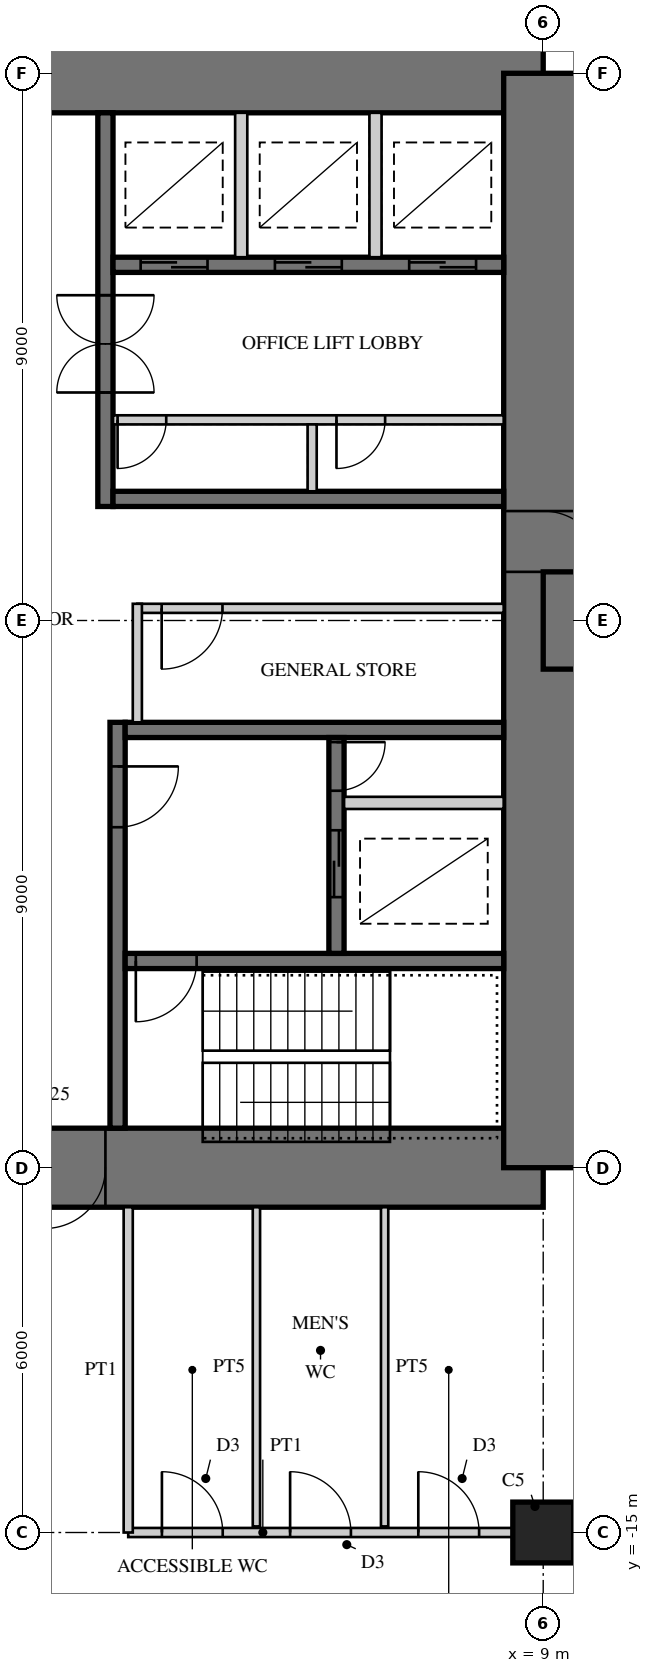
"""IFC4 building model, lengths in metres.
Left out: names, types, materials, properties, quantities, classifications, styles, units other than length and angle.
Written with IfcOpenShell. Run it as: python <this file> out.ifc"""

import sys

from ifc_helpers import new_model, si_unit, direction, frame, frame_2d, origin, origin_2d, place, context, subcontext, project, spatial, rectangle, extrude, element, fill, save


model = new_model("IFC4")
c1 = context("Model", 3, precision=1e-05, world=origin(), true_north=direction((0.0, 1.0)))
c2 = subcontext(c1, "Body", "Model", "MODEL_VIEW")
j1 = project(units=[si_unit("LENGTHUNIT", "METRE"), si_unit("PLANEANGLEUNIT", "RADIAN")], contexts=[c1])
p1 = place(None, origin())
s1 = spatial("IfcSite", under=j1, at=p1, CompositionType="ELEMENT")
p2 = place(p1, origin())
s2 = spatial("IfcBuilding", under=s1, at=p2, CompositionType="ELEMENT")
p3 = place(p2, frame((0.0, 0.0, 160.5)))
s3 = spatial("IfcBuildingStorey", under=s2, at=p3, CompositionType="ELEMENT", Elevation=160.5)
p4 = place(p3, frame((9.0, 9.0, 0.0), z_axis=(0.0, 0.0, 1.0), x_axis=(-1.0, 0.0, 0.0)))
e1 = element("IfcWall", 1, at=p4, inside=s3, PredefinedType="SHEAR", context=c2, shape_type="SweptSolid", body=[
    extrude(rectangle(XDim=18.0, YDim=1.3, at=frame_2d((9.0, 0.0))), origin(), (0.0, 0.0, 1.0), 4.0),
])
p5 = place(p4, frame((9.8, 0.0, 0.0)))
e2 = element("IfcOpeningElement", 2, at=p5, cuts=e1, PredefinedType="OPENING", context=c2, shape_type="SweptSolid", body=[
    extrude(rectangle(XDim=1.0, YDim=2.4, at=frame_2d((0.5, 1.2))), frame((0.0, 0.66, 0.0), z_axis=(0.0, -1.0, 0.0), x_axis=(1.0, 0.0, 0.0)), (0.0, 0.0, 1.0), 1.32),
])
p6 = place(p3, frame((-9.0, -9.0, 0.0), z_axis=(0.0, 0.0, 1.0), x_axis=(1.0, 0.0, 0.0)))
e3 = element("IfcWall", 3, at=p6, inside=s3, PredefinedType="SHEAR", context=c2, shape_type="SweptSolid", body=[
    extrude(rectangle(XDim=18.0, YDim=1.3, at=frame_2d((9.0, 0.0))), origin(), (0.0, 0.0, 1.0), 4.0),
])
p7 = place(p6, frame((9.8, 0.0, 0.0)))
e4 = element("IfcOpeningElement", 4, at=p7, cuts=e3, PredefinedType="OPENING", context=c2, shape_type="SweptSolid", body=[
    extrude(rectangle(XDim=1.0, YDim=2.4, at=frame_2d((0.5, 1.2))), frame((0.0, 0.66, 0.0), z_axis=(0.0, -1.0, 0.0), x_axis=(1.0, 0.0, 0.0)), (0.0, 0.0, 1.0), 1.32),
])
p8 = place(p3, frame((9.0, -9.0, 0.0), z_axis=(0.0, 0.0, 1.0), x_axis=(0.0, 1.0, 0.0)))
e5 = element("IfcWall", 5, at=p8, inside=s3, PredefinedType="SHEAR", context=c2, shape_type="SweptSolid", body=[
    extrude(rectangle(XDim=18.0, YDim=1.3, at=frame_2d((9.0, 0.0))), origin(), (0.0, 0.0, 1.0), 4.0),
])
p9 = place(p8, frame((9.8, 0.0, 0.0)))
e6 = element("IfcOpeningElement", 6, at=p9, cuts=e5, PredefinedType="OPENING", context=c2, shape_type="SweptSolid", body=[
    extrude(rectangle(XDim=1.0, YDim=2.4, at=frame_2d((0.5, 1.2))), frame((0.0, 0.66, 0.0), z_axis=(0.0, -1.0, 0.0), x_axis=(1.0, 0.0, 0.0)), (0.0, 0.0, 1.0), 1.32),
])
p10 = place(p3, frame((1.8, 1.875, 0.0), z_axis=(0.0, 0.0, 1.0), x_axis=(0.0, 1.0, 0.0)))
e7 = element("IfcWall", 7, at=p10, inside=s3, PredefinedType="SHEAR", context=c2, shape_type="SweptSolid", body=[
    extrude(rectangle(XDim=6.475, YDim=0.25, at=frame_2d((3.238, 0.0))), origin(), (0.0, 0.0, 1.0), 4.0),
])
p11 = place(p10, frame((1.875, 0.0, 0.0)))
e8 = element("IfcOpeningElement", 8, at=p11, cuts=e7, PredefinedType="OPENING", context=c2, shape_type="SweptSolid", body=[
    extrude(rectangle(XDim=1.6, YDim=2.4, at=frame_2d((0.8, 1.2))), frame((0.0, 0.135, 0.0), z_axis=(0.0, -1.0, 0.0), x_axis=(1.0, 0.0, 0.0)), (0.0, 0.0, 1.0), 0.27),
])
p12 = place(p3, frame((1.925, 2.0, 0.0), z_axis=(0.0, 0.0, 1.0), x_axis=(1.0, 0.0, 0.0)))
e9 = element("IfcWall", 9, at=p12, inside=s3, PredefinedType="SHEAR", context=c2, shape_type="SweptSolid", body=[
    extrude(rectangle(XDim=6.425, YDim=0.25, at=frame_2d((3.212, 0.0))), origin(), (0.0, 0.0, 1.0), 4.0),
])
p13 = place(p3, frame((1.925, 5.85, 0.0), z_axis=(0.0, 0.0, 1.0), x_axis=(1.0, 0.0, 0.0)))
e10 = element("IfcWall", 10, at=p13, inside=s3, PredefinedType="SHEAR", context=c2, shape_type="SweptSolid", body=[
    extrude(rectangle(XDim=6.425, YDim=0.25, at=frame_2d((3.212, 0.0))), origin(), (0.0, 0.0, 1.0), 4.0),
])
p14 = place(p13, frame((0.454, 0.0, 0.0)))
e11 = element("IfcOpeningElement", 11, at=p14, cuts=e10, PredefinedType="OPENING", context=c2, shape_type="SweptSolid", body=[
    extrude(rectangle(XDim=1.1, YDim=2.2, at=frame_2d((0.55, 1.1))), frame((0.0, 0.135, 0.0), z_axis=(0.0, -1.0, 0.0), x_axis=(1.0, 0.0, 0.0)), (0.0, 0.0, 1.0), 0.27),
])
p15 = place(p13, frame((2.663, 0.0, 0.0)))
e12 = element("IfcOpeningElement", 12, at=p15, cuts=e10, PredefinedType="OPENING", context=c2, shape_type="SweptSolid", body=[
    extrude(rectangle(XDim=1.1, YDim=2.2, at=frame_2d((0.55, 1.1))), frame((0.0, 0.135, 0.0), z_axis=(0.0, -1.0, 0.0), x_axis=(1.0, 0.0, 0.0)), (0.0, 0.0, 1.0), 0.27),
])
p16 = place(p13, frame((4.871, 0.0, 0.0)))
e13 = element("IfcOpeningElement", 13, at=p16, cuts=e10, PredefinedType="OPENING", context=c2, shape_type="SweptSolid", body=[
    extrude(rectangle(XDim=1.1, YDim=2.2, at=frame_2d((0.55, 1.1))), frame((0.0, 0.135, 0.0), z_axis=(0.0, -1.0, 0.0), x_axis=(1.0, 0.0, 0.0)), (0.0, 0.0, 1.0), 0.27),
])
p17 = place(p3, frame((1.925, 3.3, 0.0), z_axis=(0.0, 0.0, 1.0), x_axis=(1.0, 0.0, 0.0)))
e14 = element("IfcWall", 14, at=p17, inside=s3, PredefinedType="PARTITIONING", context=c2, shape_type="SweptSolid", body=[
    extrude(rectangle(XDim=6.425, YDim=0.15, at=frame_2d((3.212, 0.0))), origin(), (0.0, 0.0, 1.0), 4.0),
])
p18 = place(p17, frame((0.075, 0.0, 0.0)))
e15 = element("IfcOpeningElement", 15, at=p18, cuts=e14, PredefinedType="OPENING", context=c2, shape_type="SweptSolid", body=[
    extrude(rectangle(XDim=0.8, YDim=2.1, at=frame_2d((0.4, 1.05))), frame((0.0, 0.085, 0.0), z_axis=(0.0, -1.0, 0.0), x_axis=(1.0, 0.0, 0.0)), (0.0, 0.0, 1.0), 0.17),
])
p19 = place(p17, frame((3.675, 0.0, 0.0)))
e16 = element("IfcOpeningElement", 16, at=p19, cuts=e14, PredefinedType="OPENING", context=c2, shape_type="SweptSolid", body=[
    extrude(rectangle(XDim=0.8, YDim=2.1, at=frame_2d((0.4, 1.05))), frame((0.0, 0.085, 0.0), z_axis=(0.0, -1.0, 0.0), x_axis=(1.0, 0.0, 0.0)), (0.0, 0.0, 1.0), 0.17),
])
p20 = place(p3, frame((5.2, 2.125, 0.0), z_axis=(0.0, 0.0, 1.0), x_axis=(0.0, 1.0, 0.0)))
e17 = element("IfcWall", 17, at=p20, inside=s3, PredefinedType="PARTITIONING", context=c2, shape_type="SweptSolid", body=[
    extrude(rectangle(XDim=1.1, YDim=0.15, at=frame_2d((0.55, 0.0))), origin(), (0.0, 0.0, 1.0), 4.0),
])
for number, where, z_axis, x_axis in (
    (18, (4.033, 5.975, 0.0), (0.0, 0.0, 1.0), (0.0, 1.0, 0.0)),
    (19, (6.242, 5.975, 0.0), (0.0, 0.0, 1.0), (0.0, 1.0, 0.0)),
):
    element("IfcWall", number, at=place(p3, frame(where, z_axis=z_axis, x_axis=x_axis)), inside=s3, PredefinedType="PARTITIONING", context=c2, shape_type="SweptSolid", body=[
        extrude(rectangle(XDim=2.375, YDim=0.2, at=frame_2d((1.188, 0.0))), origin(), (0.0, 0.0, 1.0), 4.0),
    ])
p21 = place(p3, frame((2.0, -1.675, 0.0), z_axis=(0.0, 0.0, 1.0), x_axis=(0.0, -1.0, 0.0)))
e20 = element("IfcWall", 20, at=p21, inside=s3, PredefinedType="SHEAR", context=c2, shape_type="SweptSolid", body=[
    extrude(rectangle(XDim=6.675, YDim=0.25, at=frame_2d((3.337, 0.0))), origin(), (0.0, 0.0, 1.0), 4.0),
])
p22 = place(p21, frame((0.725, 0.0, 0.0)))
e21 = element("IfcOpeningElement", 21, at=p22, cuts=e20, PredefinedType="OPENING", context=c2, shape_type="SweptSolid", body=[
    extrude(rectangle(XDim=1.0, YDim=2.1, at=frame_2d((0.5, 1.05))), frame((0.0, 0.135, 0.0), z_axis=(0.0, -1.0, 0.0), x_axis=(1.0, 0.0, 0.0)), (0.0, 0.0, 1.0), 0.27),
])
p23 = place(p3, frame((2.125, -1.8, 0.0), z_axis=(0.0, 0.0, 1.0), x_axis=(1.0, 0.0, 0.0)))
e22 = element("IfcWall", 22, at=p23, inside=s3, PredefinedType="SHEAR", context=c2, shape_type="SweptSolid", body=[
    extrude(rectangle(XDim=6.225, YDim=0.25, at=frame_2d((3.113, 0.0))), origin(), (0.0, 0.0, 1.0), 4.0),
])
p24 = place(p3, frame((2.125, -5.6, 0.0), z_axis=(0.0, 0.0, 1.0), x_axis=(1.0, 0.0, 0.0)))
e23 = element("IfcWall", 23, at=p24, inside=s3, PredefinedType="SHEAR", context=c2, shape_type="SweptSolid", body=[
    extrude(rectangle(XDim=6.225, YDim=0.25, at=frame_2d((3.113, 0.0))), origin(), (0.0, 0.0, 1.0), 4.0),
])
p25 = place(p24, frame((0.175, 0.0, 0.0)))
e24 = element("IfcOpeningElement", 24, at=p25, cuts=e23, PredefinedType="OPENING", context=c2, shape_type="SweptSolid", body=[
    extrude(rectangle(XDim=1.0, YDim=2.1, at=frame_2d((0.5, 1.05))), frame((0.0, 0.135, 0.0), z_axis=(0.0, -1.0, 0.0), x_axis=(1.0, 0.0, 0.0)), (0.0, 0.0, 1.0), 0.27),
])
p26 = place(p3, frame((5.6, -1.925, 0.0), z_axis=(0.0, 0.0, 1.0), x_axis=(0.0, -1.0, 0.0)))
e25 = element("IfcWall", 25, at=p26, inside=s3, PredefinedType="SHEAR", context=c2, shape_type="SweptSolid", body=[
    extrude(rectangle(XDim=3.55, YDim=0.25, at=frame_2d((1.775, 0.0))), origin(), (0.0, 0.0, 1.0), 4.0),
])
p27 = place(p26, frame((1.525, 0.0, 0.0)))
e26 = element("IfcOpeningElement", 26, at=p27, cuts=e25, PredefinedType="OPENING", context=c2, shape_type="SweptSolid", body=[
    extrude(rectangle(XDim=1.1, YDim=2.2, at=frame_2d((0.55, 1.1))), frame((0.0, 0.135, 0.0), z_axis=(0.0, -1.0, 0.0), x_axis=(1.0, 0.0, 0.0)), (0.0, 0.0, 1.0), 0.27),
])
p28 = place(p26, frame((0.075, 0.0, 0.0)))
e27 = element("IfcOpeningElement", 27, at=p28, cuts=e25, PredefinedType="OPENING", context=c2, shape_type="SweptSolid", body=[
    extrude(rectangle(XDim=0.8, YDim=2.1, at=frame_2d((0.4, 1.05))), frame((0.0, 0.135, 0.0), z_axis=(0.0, -1.0, 0.0), x_axis=(1.0, 0.0, 0.0)), (0.0, 0.0, 1.0), 0.27),
])
p29 = place(p3, frame((5.725, -3.0, 0.0), z_axis=(0.0, 0.0, 1.0), x_axis=(1.0, 0.0, 0.0)))
e28 = element("IfcWall", 28, at=p29, inside=s3, PredefinedType="PARTITIONING", context=c2, shape_type="SweptSolid", body=[
    extrude(rectangle(XDim=2.625, YDim=0.2, at=frame_2d((1.312, 0.0))), origin(), (0.0, 0.0, 1.0), 4.0),
])
p30 = place(p3, frame((9.0, 0.0, 0.0), z_axis=(0.0, 0.0, 1.0), x_axis=(1.0, 0.0, 0.0)))
e29 = element("IfcWall", 29, at=p30, inside=s3, PredefinedType="SHEAR", context=c2, shape_type="SweptSolid", body=[
    extrude(rectangle(XDim=4.05, YDim=1.6, at=frame_2d((2.025, 0.0))), origin(), (0.0, 0.0, 1.0), 4.0),
])
p31 = place(p3, frame((9.0, -15.0, 0.0), z_axis=(0.0, 0.0, 1.0), x_axis=(1.0, 0.0, 0.0)))
e30 = element("IfcColumn", 30, at=p31, inside=s3, PredefinedType="COLUMN", context=c2, shape_type="SweptSolid", body=[
    extrude(rectangle(XDim=1.0, YDim=1.0, at=origin_2d()), origin(), (0.0, 0.0, 1.0), 4.0),
])
p32 = place(p3, frame((2.325, 0.2, 0.0), z_axis=(0.0, 0.0, 1.0), x_axis=(1.0, 0.0, 0.0)))
e31 = element("IfcWall", 31, at=p32, inside=s3, PredefinedType="PARTITIONING", context=c2, shape_type="SweptSolid", body=[
    extrude(rectangle(XDim=6.025, YDim=0.15, at=frame_2d((3.013, 0.0))), origin(), (0.0, 0.0, 1.0), 3.75),
])
p33 = place(p32, frame((0.4, 0.0, 0.0)))
e32 = element("IfcOpeningElement", 32, at=p33, cuts=e31, PredefinedType="OPENING", context=c2, shape_type="SweptSolid", body=[
    extrude(rectangle(XDim=1.0, YDim=2.1, at=frame_2d((0.5, 1.05))), frame((0.0, 0.085, 0.0), z_axis=(0.0, -1.0, 0.0), x_axis=(1.0, 0.0, 0.0)), (0.0, 0.0, 1.0), 0.17),
])
p34 = place(p3, frame((2.325, -1.675, 0.0), z_axis=(0.0, 0.0, 1.0), x_axis=(0.0, 1.0, 0.0)))
e33 = element("IfcWall", 33, at=p34, inside=s3, PredefinedType="PARTITIONING", context=c2, shape_type="SweptSolid", body=[
    extrude(rectangle(XDim=1.95, YDim=0.15, at=frame_2d((0.975, 0.0))), origin(), (0.0, 0.0, 1.0), 3.75),
])
p35 = place(p3, frame((2.175, -15.0, 0.0), z_axis=(0.0, 0.0, 1.0), x_axis=(1.0, 0.0, 0.0)))
e34 = element("IfcWall", 34, at=p35, inside=s3, PredefinedType="PARTITIONING", context=c2, shape_type="SweptSolid", body=[
    extrude(rectangle(XDim=6.325, YDim=0.15, at=frame_2d((3.163, 0.0))), origin(), (0.0, 0.0, 1.0), 2.7),
])
p36 = place(p35, frame((0.554, 0.0, 0.0)))
e35 = element("IfcOpeningElement", 35, at=p36, cuts=e34, PredefinedType="OPENING", context=c2, shape_type="SweptSolid", body=[
    extrude(rectangle(XDim=1.0, YDim=2.1, at=frame_2d((0.5, 1.05))), frame((0.0, 0.085, 0.0), z_axis=(0.0, -1.0, 0.0), x_axis=(1.0, 0.0, 0.0)), (0.0, 0.0, 1.0), 0.17),
])
p37 = place(p35, frame((2.663, 0.0, 0.0)))
e36 = element("IfcOpeningElement", 36, at=p37, cuts=e34, PredefinedType="OPENING", context=c2, shape_type="SweptSolid", body=[
    extrude(rectangle(XDim=1.0, YDim=2.1, at=frame_2d((0.5, 1.05))), frame((0.0, 0.085, 0.0), z_axis=(0.0, -1.0, 0.0), x_axis=(1.0, 0.0, 0.0)), (0.0, 0.0, 1.0), 0.17),
])
p38 = place(p35, frame((4.771, 0.0, 0.0)))
e37 = element("IfcOpeningElement", 37, at=p38, cuts=e34, PredefinedType="OPENING", context=c2, shape_type="SweptSolid", body=[
    extrude(rectangle(XDim=1.0, YDim=2.1, at=frame_2d((0.5, 1.05))), frame((0.0, 0.085, 0.0), z_axis=(0.0, -1.0, 0.0), x_axis=(1.0, 0.0, 0.0)), (0.0, 0.0, 1.0), 0.17),
])
p39 = place(p3, frame((2.175, -9.65, 0.0), z_axis=(0.0, 0.0, 1.0), x_axis=(0.0, -1.0, 0.0)))
e38 = element("IfcWall", 38, at=p39, inside=s3, PredefinedType="PARTITIONING", context=c2, shape_type="SweptSolid", body=[
    extrude(rectangle(XDim=5.35, YDim=0.15, at=frame_2d((2.675, 0.0))), origin(), (0.0, 0.0, 1.0), 3.75),
])
for number, where, z_axis, x_axis in (
    (39, (4.283, -9.65, 0.0), (0.0, 0.0, 1.0), (0.0, -1.0, 0.0)),
    (40, (6.392, -9.65, 0.0), (0.0, 0.0, 1.0), (0.0, -1.0, 0.0)),
):
    element("IfcWall", number, at=place(p3, frame(where, z_axis=z_axis, x_axis=x_axis)), inside=s3, PredefinedType="PLUMBINGWALL", context=c2, shape_type="SweptSolid", body=[
        extrude(rectangle(XDim=5.25, YDim=0.12, at=frame_2d((2.625, 0.0))), origin(), (0.0, 0.0, 1.0), 3.75),
    ])
p40 = place(p33, frame((1.0, 0.0, 0.0), z_axis=(0.0, 0.0, 1.0), x_axis=(-1.0, 0.0, 0.0)))
e41 = element("IfcDoor", 41, at=p40, inside=s3, OperationType="SINGLE_SWING_RIGHT", PredefinedType="DOOR", context=c2, shape_type="SweptSolid", body=[
    extrude(rectangle(XDim=1.0, YDim=2.1, at=frame_2d((0.5, 1.05))), frame((0.0, 0.025, 0.0), z_axis=(0.0, -1.0, 0.0), x_axis=(1.0, 0.0, 0.0)), (0.0, 0.0, 1.0), 0.05),
])
fill(e32, e41)
p41 = place(p36, origin())
e42 = element("IfcDoor", 42, at=p41, inside=s3, OperationType="SINGLE_SWING_LEFT", PredefinedType="DOOR", context=c2, shape_type="SweptSolid", body=[
    extrude(rectangle(XDim=1.0, YDim=2.1, at=frame_2d((0.5, 1.05))), frame((0.0, 0.025, 0.0), z_axis=(0.0, -1.0, 0.0), x_axis=(1.0, 0.0, 0.0)), (0.0, 0.0, 1.0), 0.05),
])
fill(e35, e42)
p42 = place(p37, origin())
e43 = element("IfcDoor", 43, at=p42, inside=s3, OperationType="SINGLE_SWING_LEFT", PredefinedType="DOOR", context=c2, shape_type="SweptSolid", body=[
    extrude(rectangle(XDim=1.0, YDim=2.1, at=frame_2d((0.5, 1.05))), frame((0.0, 0.025, 0.0), z_axis=(0.0, -1.0, 0.0), x_axis=(1.0, 0.0, 0.0)), (0.0, 0.0, 1.0), 0.05),
])
fill(e36, e43)
p43 = place(p38, origin())
e44 = element("IfcDoor", 44, at=p43, inside=s3, OperationType="SINGLE_SWING_LEFT", PredefinedType="DOOR", context=c2, shape_type="SweptSolid", body=[
    extrude(rectangle(XDim=1.0, YDim=2.1, at=frame_2d((0.5, 1.05))), frame((0.0, 0.025, 0.0), z_axis=(0.0, -1.0, 0.0), x_axis=(1.0, 0.0, 0.0)), (0.0, 0.0, 1.0), 0.05),
])
fill(e37, e44)
p44 = place(p7, frame((1.0, 0.0, 0.0), z_axis=(0.0, 0.0, 1.0), x_axis=(-1.0, 0.0, 0.0)))
e45 = element("IfcDoor", 45, at=p44, inside=s3, OperationType="SINGLE_SWING_RIGHT", PredefinedType="DOOR", context=c2, shape_type="SweptSolid", body=[
    extrude(rectangle(XDim=1.0, YDim=2.4, at=frame_2d((0.5, 1.2))), frame((0.0, -0.005, 0.0), z_axis=(0.0, -1.0, 0.0), x_axis=(1.0, 0.0, 0.0)), (0.0, 0.0, 1.0), 0.05),
])
fill(e4, e45)
p45 = place(p9, frame((1.0, 0.0, 0.0), z_axis=(0.0, 0.0, 1.0), x_axis=(-1.0, 0.0, 0.0)))
e46 = element("IfcDoor", 46, at=p45, inside=s3, OperationType="SINGLE_SWING_RIGHT", PredefinedType="DOOR", context=c2, shape_type="SweptSolid", body=[
    extrude(rectangle(XDim=1.0, YDim=2.4, at=frame_2d((0.5, 1.2))), frame((0.0, -0.005, 0.0), z_axis=(0.0, -1.0, 0.0), x_axis=(1.0, 0.0, 0.0)), (0.0, 0.0, 1.0), 0.05),
])
fill(e6, e46)
p46 = place(p14, origin())
e47 = element("IfcDoor", 47, at=p46, inside=s3, OperationType="DOUBLE_DOOR_SLIDING", PredefinedType="DOOR", context=c2, shape_type="SweptSolid", body=[
    extrude(rectangle(XDim=1.1, YDim=2.2, at=frame_2d((0.55, 1.1))), frame((0.0, 0.025, 0.0), z_axis=(0.0, -1.0, 0.0), x_axis=(1.0, 0.0, 0.0)), (0.0, 0.0, 1.0), 0.05),
])
fill(e11, e47)
p47 = place(p15, origin())
e48 = element("IfcDoor", 48, at=p47, inside=s3, OperationType="DOUBLE_DOOR_SLIDING", PredefinedType="DOOR", context=c2, shape_type="SweptSolid", body=[
    extrude(rectangle(XDim=1.1, YDim=2.2, at=frame_2d((0.55, 1.1))), frame((0.0, 0.025, 0.0), z_axis=(0.0, -1.0, 0.0), x_axis=(1.0, 0.0, 0.0)), (0.0, 0.0, 1.0), 0.05),
])
fill(e12, e48)
p48 = place(p16, origin())
e49 = element("IfcDoor", 49, at=p48, inside=s3, OperationType="DOUBLE_DOOR_SLIDING", PredefinedType="DOOR", context=c2, shape_type="SweptSolid", body=[
    extrude(rectangle(XDim=1.1, YDim=2.2, at=frame_2d((0.55, 1.1))), frame((0.0, 0.025, 0.0), z_axis=(0.0, -1.0, 0.0), x_axis=(1.0, 0.0, 0.0)), (0.0, 0.0, 1.0), 0.05),
])
fill(e13, e49)
p49 = place(p11, origin())
e50 = element("IfcDoor", 50, at=p49, inside=s3, OperationType="DOUBLE_DOOR_DOUBLE_SWING", PredefinedType="DOOR", context=c2, shape_type="SweptSolid", body=[
    extrude(rectangle(XDim=1.6, YDim=2.4, at=frame_2d((0.8, 1.2))), frame((0.0, 0.025, 0.0), z_axis=(0.0, -1.0, 0.0), x_axis=(1.0, 0.0, 0.0)), (0.0, 0.0, 1.0), 0.05),
])
fill(e8, e50)
p50 = place(p18, frame((0.8, 0.0, 0.0), z_axis=(0.0, 0.0, 1.0), x_axis=(-1.0, 0.0, 0.0)))
e51 = element("IfcDoor", 51, at=p50, inside=s3, OperationType="SINGLE_SWING_RIGHT", PredefinedType="DOOR", context=c2, shape_type="SweptSolid", body=[
    extrude(rectangle(XDim=0.8, YDim=2.1, at=frame_2d((0.4, 1.05))), frame((0.0, 0.025, 0.0), z_axis=(0.0, -1.0, 0.0), x_axis=(1.0, 0.0, 0.0)), (0.0, 0.0, 1.0), 0.05),
])
fill(e15, e51)
p51 = place(p19, frame((0.8, 0.0, 0.0), z_axis=(0.0, 0.0, 1.0), x_axis=(-1.0, 0.0, 0.0)))
e52 = element("IfcDoor", 52, at=p51, inside=s3, OperationType="SINGLE_SWING_RIGHT", PredefinedType="DOOR", context=c2, shape_type="SweptSolid", body=[
    extrude(rectangle(XDim=0.8, YDim=2.1, at=frame_2d((0.4, 1.05))), frame((0.0, 0.025, 0.0), z_axis=(0.0, -1.0, 0.0), x_axis=(1.0, 0.0, 0.0)), (0.0, 0.0, 1.0), 0.05),
])
fill(e16, e52)
p52 = place(p22, origin())
e53 = element("IfcDoor", 53, at=p52, inside=s3, OperationType="SINGLE_SWING_LEFT", PredefinedType="DOOR", context=c2, shape_type="SweptSolid", body=[
    extrude(rectangle(XDim=1.0, YDim=2.1, at=frame_2d((0.5, 1.05))), frame((0.0, 0.025, 0.0), z_axis=(0.0, -1.0, 0.0), x_axis=(1.0, 0.0, 0.0)), (0.0, 0.0, 1.0), 0.05),
])
fill(e21, e53)
p53 = place(p25, frame((1.0, 0.0, 0.0), z_axis=(0.0, 0.0, 1.0), x_axis=(-1.0, 0.0, 0.0)))
e54 = element("IfcDoor", 54, at=p53, inside=s3, OperationType="SINGLE_SWING_RIGHT", PredefinedType="DOOR", context=c2, shape_type="SweptSolid", body=[
    extrude(rectangle(XDim=1.0, YDim=2.1, at=frame_2d((0.5, 1.05))), frame((0.0, 0.025, 0.0), z_axis=(0.0, -1.0, 0.0), x_axis=(1.0, 0.0, 0.0)), (0.0, 0.0, 1.0), 0.05),
])
fill(e24, e54)
p54 = place(p27, origin())
e55 = element("IfcDoor", 55, at=p54, inside=s3, OperationType="DOUBLE_DOOR_SLIDING", PredefinedType="DOOR", context=c2, shape_type="SweptSolid", body=[
    extrude(rectangle(XDim=1.1, YDim=2.2, at=frame_2d((0.55, 1.1))), frame((0.0, 0.025, 0.0), z_axis=(0.0, -1.0, 0.0), x_axis=(1.0, 0.0, 0.0)), (0.0, 0.0, 1.0), 0.05),
])
fill(e26, e55)
p55 = place(p28, origin())
e56 = element("IfcDoor", 56, at=p55, inside=s3, OperationType="SINGLE_SWING_LEFT", PredefinedType="DOOR", context=c2, shape_type="SweptSolid", body=[
    extrude(rectangle(XDim=0.8, YDim=2.1, at=frame_2d((0.4, 1.05))), frame((0.0, 0.025, 0.0), z_axis=(0.0, -1.0, 0.0), x_axis=(1.0, 0.0, 0.0)), (0.0, 0.0, 1.0), 0.05),
])
fill(e27, e56)
save(model, sys.argv[1])
